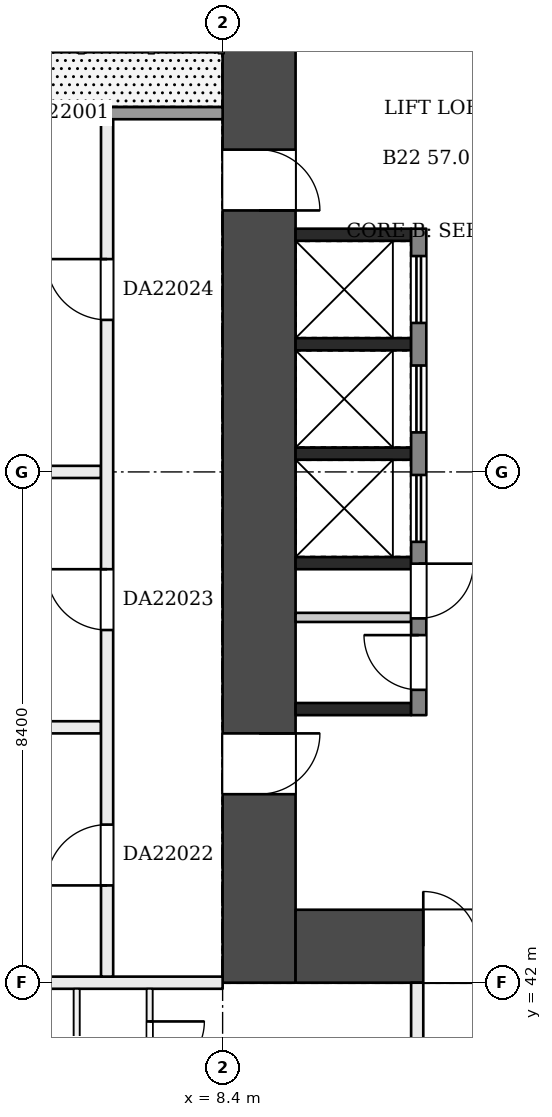
"""IFC4 building model, lengths in metres.
Left out: names, types, materials, properties, quantities, classifications, styles, units other than length and angle.
Written with IfcOpenShell. Run it as: python <this file> out.ifc"""

import sys

from ifc_helpers import new_model, si_unit, direction, frame, frame_2d, origin, place, context, subcontext, project, spatial, rectangle, extrude, element, fill, save


model = new_model("IFC4")
c1 = context("Model", 3, precision=1e-05, world=origin(), true_north=direction((0.0, 1.0)))
c2 = subcontext(c1, "Body", "Model", "MODEL_VIEW")
j1 = project(units=[si_unit("LENGTHUNIT", "METRE"), si_unit("PLANEANGLEUNIT", "RADIAN")], contexts=[c1])
p1 = place(None, origin())
s1 = spatial("IfcSite", under=j1, at=p1, CompositionType="ELEMENT")
p2 = place(p1, origin())
s2 = spatial("IfcBuilding", under=s1, at=p2, CompositionType="ELEMENT")
p3 = place(p2, frame((0.0, 0.0, 91.7)))
s3 = spatial("IfcBuildingStorey", under=s2, at=p3, CompositionType="ELEMENT", Elevation=91.7)
p4 = place(p3, frame((9.0, 58.8, 0.0), z_axis=(0.0, 0.0, 1.0), x_axis=(0.0, -1.0, 0.0)))
e1 = element("IfcWall", 1, at=p4, inside=s3, PredefinedType="SHEAR", context=c2, shape_type="SweptSolid", body=[
    extrude(rectangle(XDim=16.8, YDim=1.2, at=frame_2d((8.4, 0.0))), origin(), (0.0, 0.0, 1.0), 3.22),
])
p5 = place(p4, frame((3.1, 0.0, 0.0)))
e2 = element("IfcOpeningElement", 2, at=p5, cuts=e1, PredefinedType="OPENING", context=c2, shape_type="SweptSolid", body=[
    extrude(rectangle(XDim=1.0, YDim=2.1, at=frame_2d((0.5, 1.05))), frame((0.0, 0.61, 0.0), z_axis=(0.0, -1.0, 0.0), x_axis=(1.0, 0.0, 0.0)), (0.0, 0.0, 1.0), 1.22),
])
p6 = place(p4, frame((12.7, 0.0, 0.0)))
e3 = element("IfcOpeningElement", 3, at=p6, cuts=e1, PredefinedType="OPENING", context=c2, shape_type="SweptSolid", body=[
    extrude(rectangle(XDim=1.0, YDim=2.1, at=frame_2d((0.5, 1.05))), frame((0.0, 0.61, 0.0), z_axis=(0.0, -1.0, 0.0), x_axis=(1.0, 0.0, 0.0)), (0.0, 0.0, 1.0), 1.22),
])
p7 = place(p3, frame((9.6, 42.6, 0.0), z_axis=(0.0, 0.0, 1.0), x_axis=(1.0, 0.0, 0.0)))
e4 = element("IfcWall", 4, at=p7, inside=s3, PredefinedType="SHEAR", context=c2, shape_type="SweptSolid", body=[
    extrude(rectangle(XDim=14.4, YDim=1.2, at=frame_2d((7.2, 0.0))), origin(), (0.0, 0.0, 1.0), 3.22),
])
p8 = place(p7, frame((2.1, 0.0, 0.0)))
e5 = element("IfcOpeningElement", 5, at=p8, cuts=e4, PredefinedType="OPENING", context=c2, shape_type="SweptSolid", body=[
    extrude(rectangle(XDim=1.8, YDim=2.1, at=frame_2d((0.9, 1.05))), frame((0.0, 0.61, 0.0), z_axis=(0.0, -1.0, 0.0), x_axis=(1.0, 0.0, 0.0)), (0.0, 0.0, 1.0), 1.22),
])
for number, where, z_axis, x_axis in (
    (6, (9.6, 54.3, 0.0), (0.0, 0.0, 1.0), (1.0, 0.0, 0.0)),
    (7, (9.6, 52.5, 0.0), (0.0, 0.0, 1.0), (1.0, 0.0, 0.0)),
    (8, (9.6, 50.7, 0.0), (0.0, 0.0, 1.0), (1.0, 0.0, 0.0)),
    (9, (9.6, 48.9, 0.0), (0.0, 0.0, 1.0), (1.0, 0.0, 0.0)),
    (10, (9.6, 46.5, 0.0), (0.0, 0.0, 1.0), (1.0, 0.0, 0.0)),
):
    element("IfcWall", number, at=place(p3, frame(where, z_axis=z_axis, x_axis=x_axis)), inside=s3, PredefinedType="SHEAR", context=c2, shape_type="SweptSolid", body=[
        extrude(rectangle(XDim=1.9, YDim=0.2, at=frame_2d((0.95, 0.0))), origin(), (0.0, 0.0, 1.0), 3.22),
    ])
p9 = place(p3, frame((9.6, 48.008, 0.0), z_axis=(0.0, 0.0, 1.0), x_axis=(1.0, 0.0, 0.0)))
e11 = element("IfcWall", 11, at=p9, inside=s3, PredefinedType="PARTITIONING", context=c2, shape_type="SweptSolid", body=[
    extrude(rectangle(XDim=1.9, YDim=0.15, at=frame_2d((0.95, 0.0))), origin(), (0.0, 0.0, 1.0), 3.22),
])
p10 = place(p3, frame((11.625, 54.4, 0.0), z_axis=(0.0, 0.0, 1.0), x_axis=(0.0, -1.0, 0.0)))
e12 = element("IfcWall", 12, at=p10, inside=s3, PredefinedType="SHEAR", context=c2, shape_type="SweptSolid", body=[
    extrude(rectangle(XDim=8.0, YDim=0.25, at=frame_2d((4.0, 0.0))), origin(), (0.0, 0.0, 1.0), 3.22),
])
p11 = place(p10, frame((0.45, 0.0, 0.0)))
e13 = element("IfcOpeningElement", 13, at=p11, cuts=e12, PredefinedType="OPENING", context=c2, shape_type="SweptSolid", body=[
    extrude(rectangle(XDim=1.1, YDim=2.1, at=frame_2d((0.55, 1.05))), frame((0.0, 0.135, 0.0), z_axis=(0.0, -1.0, 0.0), x_axis=(1.0, 0.0, 0.0)), (0.0, 0.0, 1.0), 0.27),
])
p12 = place(p10, frame((2.25, 0.0, 0.0)))
e14 = element("IfcOpeningElement", 14, at=p12, cuts=e12, PredefinedType="OPENING", context=c2, shape_type="SweptSolid", body=[
    extrude(rectangle(XDim=1.1, YDim=2.1, at=frame_2d((0.55, 1.05))), frame((0.0, 0.135, 0.0), z_axis=(0.0, -1.0, 0.0), x_axis=(1.0, 0.0, 0.0)), (0.0, 0.0, 1.0), 0.27),
])
p13 = place(p10, frame((4.05, 0.0, 0.0)))
e15 = element("IfcOpeningElement", 15, at=p13, cuts=e12, PredefinedType="OPENING", context=c2, shape_type="SweptSolid", body=[
    extrude(rectangle(XDim=1.1, YDim=2.1, at=frame_2d((0.55, 1.05))), frame((0.0, 0.135, 0.0), z_axis=(0.0, -1.0, 0.0), x_axis=(1.0, 0.0, 0.0)), (0.0, 0.0, 1.0), 0.27),
])
p14 = place(p10, frame((5.509, 0.0, 0.0)))
e16 = element("IfcOpeningElement", 16, at=p14, cuts=e12, PredefinedType="OPENING", context=c2, shape_type="SweptSolid", body=[
    extrude(rectangle(XDim=0.9, YDim=2.1, at=frame_2d((0.45, 1.05))), frame((0.0, 0.135, 0.0), z_axis=(0.0, -1.0, 0.0), x_axis=(1.0, 0.0, 0.0)), (0.0, 0.0, 1.0), 0.27),
])
p15 = place(p10, frame((6.684, 0.0, 0.0)))
e17 = element("IfcOpeningElement", 17, at=p15, cuts=e12, PredefinedType="OPENING", context=c2, shape_type="SweptSolid", body=[
    extrude(rectangle(XDim=0.9, YDim=2.1, at=frame_2d((0.45, 1.05))), frame((0.0, 0.135, 0.0), z_axis=(0.0, -1.0, 0.0), x_axis=(1.0, 0.0, 0.0)), (0.0, 0.0, 1.0), 0.27),
])
p16 = place(p3, frame((2.5, 42.0, 0.0), z_axis=(0.0, 0.0, 1.0), x_axis=(1.0, 0.0, 0.0)))
e18 = element("IfcWall", 18, at=p16, inside=s3, PredefinedType="PARTITIONING", context=c2, shape_type="SweptSolid", body=[
    extrude(rectangle(XDim=5.9, YDim=0.2, at=frame_2d((2.95, 0.0))), origin(), (0.0, 0.0, 1.0), 3.22),
])
for number, where, z_axis, x_axis in (
    (19, (2.5, 46.2, 0.0), (0.0, 0.0, 1.0), (1.0, 0.0, 0.0)),
    (20, (2.5, 50.4, 0.0), (0.0, 0.0, 1.0), (1.0, 0.0, 0.0)),
):
    element("IfcWall", number, at=place(p3, frame(where, z_axis=z_axis, x_axis=x_axis)), inside=s3, PredefinedType="PARTITIONING", context=c2, shape_type="SweptSolid", body=[
        extrude(rectangle(XDim=3.9, YDim=0.2, at=frame_2d((1.95, 0.0))), origin(), (0.0, 0.0, 1.0), 3.22),
    ])
p17 = place(p3, frame((6.0, 21.0, 0.0), z_axis=(0.0, 0.0, 1.0), x_axis=(0.0, 1.0, 0.0)))
e21 = element("IfcWall", 21, at=p17, inside=s3, PredefinedType="PARTITIONING", context=c2, shape_type="SweptSolid", body=[
    extrude(rectangle(XDim=20.9, YDim=0.1, at=frame_2d((10.45, 0.0))), origin(), (0.0, 0.0, 1.0), 3.22),
])
p18 = place(p17, frame((1.6, 0.0, 0.0)))
e22 = element("IfcOpeningElement", 22, at=p18, cuts=e21, PredefinedType="OPENING", context=c2, shape_type="SweptSolid", body=[
    extrude(rectangle(XDim=0.9, YDim=2.1, at=frame_2d((0.45, 1.05))), frame((0.0, 0.06, 0.0), z_axis=(0.0, -1.0, 0.0), x_axis=(1.0, 0.0, 0.0)), (0.0, 0.0, 1.0), 0.12),
])
p19 = place(p17, frame((5.8, 0.0, 0.0)))
e23 = element("IfcOpeningElement", 23, at=p19, cuts=e21, PredefinedType="OPENING", context=c2, shape_type="SweptSolid", body=[
    extrude(rectangle(XDim=0.9, YDim=2.1, at=frame_2d((0.45, 1.05))), frame((0.0, 0.06, 0.0), z_axis=(0.0, -1.0, 0.0), x_axis=(1.0, 0.0, 0.0)), (0.0, 0.0, 1.0), 0.12),
])
p20 = place(p17, frame((10.0, 0.0, 0.0)))
e24 = element("IfcOpeningElement", 24, at=p20, cuts=e21, PredefinedType="OPENING", context=c2, shape_type="SweptSolid", body=[
    extrude(rectangle(XDim=0.9, YDim=2.1, at=frame_2d((0.45, 1.05))), frame((0.0, 0.06, 0.0), z_axis=(0.0, -1.0, 0.0), x_axis=(1.0, 0.0, 0.0)), (0.0, 0.0, 1.0), 0.12),
])
p21 = place(p17, frame((14.2, 0.0, 0.0)))
e25 = element("IfcOpeningElement", 25, at=p21, cuts=e21, PredefinedType="OPENING", context=c2, shape_type="SweptSolid", body=[
    extrude(rectangle(XDim=0.9, YDim=2.1, at=frame_2d((0.45, 1.05))), frame((0.0, 0.06, 0.0), z_axis=(0.0, -1.0, 0.0), x_axis=(1.0, 0.0, 0.0)), (0.0, 0.0, 1.0), 0.12),
])
p22 = place(p17, frame((18.4, 0.0, 0.0)))
e26 = element("IfcOpeningElement", 26, at=p22, cuts=e21, PredefinedType="OPENING", context=c2, shape_type="SweptSolid", body=[
    extrude(rectangle(XDim=0.9, YDim=2.1, at=frame_2d((0.45, 1.05))), frame((0.0, 0.06, 0.0), z_axis=(0.0, -1.0, 0.0), x_axis=(1.0, 0.0, 0.0)), (0.0, 0.0, 1.0), 0.12),
])
p23 = place(p3, frame((6.5, 42.1, 0.0), z_axis=(0.0, 0.0, 1.0), x_axis=(0.0, 1.0, 0.0)))
e27 = element("IfcWall", 27, at=p23, inside=s3, PredefinedType="PARTITIONING", context=c2, shape_type="SweptSolid", body=[
    extrude(rectangle(XDim=14.2, YDim=0.2, at=frame_2d((7.1, 0.0))), origin(), (0.0, 0.0, 1.0), 3.22),
])
p24 = place(p23, frame((1.5, 0.0, 0.0)))
e28 = element("IfcOpeningElement", 28, at=p24, cuts=e27, PredefinedType="OPENING", context=c2, shape_type="SweptSolid", body=[
    extrude(rectangle(XDim=1.0, YDim=2.1, at=frame_2d((0.5, 1.05))), frame((0.0, 0.11, 0.0), z_axis=(0.0, -1.0, 0.0), x_axis=(1.0, 0.0, 0.0)), (0.0, 0.0, 1.0), 0.22),
])
p25 = place(p23, frame((5.7, 0.0, 0.0)))
e29 = element("IfcOpeningElement", 29, at=p25, cuts=e27, PredefinedType="OPENING", context=c2, shape_type="SweptSolid", body=[
    extrude(rectangle(XDim=1.0, YDim=2.1, at=frame_2d((0.5, 1.05))), frame((0.0, 0.11, 0.0), z_axis=(0.0, -1.0, 0.0), x_axis=(1.0, 0.0, 0.0)), (0.0, 0.0, 1.0), 0.22),
])
p26 = place(p23, frame((10.8, 0.0, 0.0)))
e30 = element("IfcOpeningElement", 30, at=p26, cuts=e27, PredefinedType="OPENING", context=c2, shape_type="SweptSolid", body=[
    extrude(rectangle(XDim=1.0, YDim=2.1, at=frame_2d((0.5, 1.05))), frame((0.0, 0.11, 0.0), z_axis=(0.0, -1.0, 0.0), x_axis=(1.0, 0.0, 0.0)), (0.0, 0.0, 1.0), 0.22),
])
p27 = place(p3, frame((7.2, 21.0, 0.0), z_axis=(0.0, 0.0, 1.0), x_axis=(0.0, 1.0, 0.0)))
e31 = element("IfcWall", 31, at=p27, inside=s3, PredefinedType="PARTITIONING", context=c2, shape_type="SweptSolid", body=[
    extrude(rectangle(XDim=20.9, YDim=0.1, at=frame_2d((10.45, 0.0))), origin(), (0.0, 0.0, 1.0), 3.22),
])
p28 = place(p27, frame((0.7, 0.0, 0.0)))
e32 = element("IfcOpeningElement", 32, at=p28, cuts=e31, PredefinedType="OPENING", context=c2, shape_type="SweptSolid", body=[
    extrude(rectangle(XDim=0.9, YDim=2.1, at=frame_2d((0.45, 1.05))), frame((0.0, 0.06, 0.0), z_axis=(0.0, -1.0, 0.0), x_axis=(1.0, 0.0, 0.0)), (0.0, 0.0, 1.0), 0.12),
])
p29 = place(p27, frame((2.838, 0.0, 0.0)))
e33 = element("IfcOpeningElement", 33, at=p29, cuts=e31, PredefinedType="OPENING", context=c2, shape_type="SweptSolid", body=[
    extrude(rectangle(XDim=0.9, YDim=2.1, at=frame_2d((0.45, 1.05))), frame((0.0, 0.06, 0.0), z_axis=(0.0, -1.0, 0.0), x_axis=(1.0, 0.0, 0.0)), (0.0, 0.0, 1.0), 0.12),
])
p30 = place(p27, frame((6.375, 0.0, 0.0)))
e34 = element("IfcOpeningElement", 34, at=p30, cuts=e31, PredefinedType="OPENING", context=c2, shape_type="SweptSolid", body=[
    extrude(rectangle(XDim=0.9, YDim=2.1, at=frame_2d((0.45, 1.05))), frame((0.0, 0.06, 0.0), z_axis=(0.0, -1.0, 0.0), x_axis=(1.0, 0.0, 0.0)), (0.0, 0.0, 1.0), 0.12),
])
p31 = place(p27, frame((9.113, 0.0, 0.0)))
e35 = element("IfcOpeningElement", 35, at=p31, cuts=e31, PredefinedType="OPENING", context=c2, shape_type="SweptSolid", body=[
    extrude(rectangle(XDim=0.9, YDim=2.1, at=frame_2d((0.45, 1.05))), frame((0.0, 0.06, 0.0), z_axis=(0.0, -1.0, 0.0), x_axis=(1.0, 0.0, 0.0)), (0.0, 0.0, 1.0), 0.12),
])
p32 = place(p27, frame((11.25, 0.0, 0.0)))
e36 = element("IfcOpeningElement", 36, at=p32, cuts=e31, PredefinedType="OPENING", context=c2, shape_type="SweptSolid", body=[
    extrude(rectangle(XDim=0.9, YDim=2.1, at=frame_2d((0.45, 1.05))), frame((0.0, 0.06, 0.0), z_axis=(0.0, -1.0, 0.0), x_axis=(1.0, 0.0, 0.0)), (0.0, 0.0, 1.0), 0.12),
])
p33 = place(p27, frame((14.288, 0.0, 0.0)))
e37 = element("IfcOpeningElement", 37, at=p33, cuts=e31, PredefinedType="OPENING", context=c2, shape_type="SweptSolid", body=[
    extrude(rectangle(XDim=0.9, YDim=2.1, at=frame_2d((0.45, 1.05))), frame((0.0, 0.06, 0.0), z_axis=(0.0, -1.0, 0.0), x_axis=(1.0, 0.0, 0.0)), (0.0, 0.0, 1.0), 0.12),
])
p34 = place(p27, frame((17.025, 0.0, 0.0)))
e38 = element("IfcOpeningElement", 38, at=p34, cuts=e31, PredefinedType="OPENING", context=c2, shape_type="SweptSolid", body=[
    extrude(rectangle(XDim=0.9, YDim=2.1, at=frame_2d((0.45, 1.05))), frame((0.0, 0.06, 0.0), z_axis=(0.0, -1.0, 0.0), x_axis=(1.0, 0.0, 0.0)), (0.0, 0.0, 1.0), 0.12),
])
p35 = place(p27, frame((19.463, 0.0, 0.0)))
e39 = element("IfcOpeningElement", 39, at=p35, cuts=e31, PredefinedType="OPENING", context=c2, shape_type="SweptSolid", body=[
    extrude(rectangle(XDim=0.9, YDim=2.1, at=frame_2d((0.45, 1.05))), frame((0.0, 0.06, 0.0), z_axis=(0.0, -1.0, 0.0), x_axis=(1.0, 0.0, 0.0)), (0.0, 0.0, 1.0), 0.12),
])
p36 = place(p3, frame((11.6, 10.9, 0.0), z_axis=(0.0, 0.0, 1.0), x_axis=(0.0, 1.0, 0.0)))
e40 = element("IfcWall", 40, at=p36, inside=s3, PredefinedType="PARTITIONING", context=c2, shape_type="SweptSolid", body=[
    extrude(rectangle(XDim=31.1, YDim=0.2, at=frame_2d((15.55, 0.0))), origin(), (0.0, 0.0, 1.0), 3.22),
])
p37 = place(p36, frame((6.3, 0.0, 0.0)))
e41 = element("IfcOpeningElement", 41, at=p37, cuts=e40, PredefinedType="OPENING", context=c2, shape_type="SweptSolid", body=[
    extrude(rectangle(XDim=1.0, YDim=2.1, at=frame_2d((0.5, 1.05))), frame((0.0, 0.11, 0.0), z_axis=(0.0, -1.0, 0.0), x_axis=(1.0, 0.0, 0.0)), (0.0, 0.0, 1.0), 0.22),
])
p38 = place(p36, frame((10.8, 0.0, 0.0)))
e42 = element("IfcOpeningElement", 42, at=p38, cuts=e40, PredefinedType="OPENING", context=c2, shape_type="SweptSolid", body=[
    extrude(rectangle(XDim=1.0, YDim=2.1, at=frame_2d((0.5, 1.05))), frame((0.0, 0.11, 0.0), z_axis=(0.0, -1.0, 0.0), x_axis=(1.0, 0.0, 0.0)), (0.0, 0.0, 1.0), 0.22),
])
p39 = place(p3, frame((8.4, 56.3, 0.0), z_axis=(0.0, 0.0, 1.0), x_axis=(-1.0, 0.0, 0.0)))
e43 = element("IfcWall", 43, at=p39, inside=s3, PredefinedType="SOLIDWALL", context=c2, shape_type="SweptSolid", body=[
    extrude(rectangle(XDim=3.6, YDim=0.2, at=frame_2d((1.8, 0.0))), origin(), (0.0, 0.0, 1.0), 3.22),
])
p40 = place(p39, frame((2.0, 0.0, 0.9)))
e44 = element("IfcOpeningElement", 44, at=p40, cuts=e43, PredefinedType="OPENING", context=c2, shape_type="SweptSolid", body=[
    extrude(rectangle(XDim=1.3, YDim=1.5, at=frame_2d((0.65, 0.75))), frame((0.0, 0.11, 0.0), z_axis=(0.0, -1.0, 0.0), x_axis=(1.0, 0.0, 0.0)), (0.0, 0.0, 1.0), 0.22),
])
p41 = place(p5, origin())
e45 = element("IfcDoor", 45, at=p41, inside=s3, OperationType="SINGLE_SWING_RIGHT", PredefinedType="DOOR", context=c2, shape_type="SweptSolid", body=[
    extrude(rectangle(XDim=1.0, YDim=2.1, at=frame_2d((0.5, 1.05))), frame((0.0, 0.025, 0.0), z_axis=(0.0, -1.0, 0.0), x_axis=(1.0, 0.0, 0.0)), (0.0, 0.0, 1.0), 0.05),
])
fill(e2, e45)
p42 = place(p6, origin())
e46 = element("IfcDoor", 46, at=p42, inside=s3, OperationType="SINGLE_SWING_LEFT", PredefinedType="DOOR", context=c2, shape_type="SweptSolid", body=[
    extrude(rectangle(XDim=1.0, YDim=2.1, at=frame_2d((0.5, 1.05))), frame((0.0, 0.025, 0.0), z_axis=(0.0, -1.0, 0.0), x_axis=(1.0, 0.0, 0.0)), (0.0, 0.0, 1.0), 0.05),
])
fill(e3, e46)
p43 = place(p8, origin())
e47 = element("IfcDoor", 47, at=p43, inside=s3, OperationType="DOUBLE_DOOR_SINGLE_SWING", PredefinedType="DOOR", context=c2, shape_type="SweptSolid", body=[
    extrude(rectangle(XDim=1.8, YDim=2.1, at=frame_2d((0.9, 1.05))), frame((0.0, 0.025, 0.0), z_axis=(0.0, -1.0, 0.0), x_axis=(1.0, 0.0, 0.0)), (0.0, 0.0, 1.0), 0.05),
])
fill(e5, e47)
p44 = place(p11, origin())
e48 = element("IfcDoor", 48, at=p44, inside=s3, OperationType="DOUBLE_DOOR_SLIDING", PredefinedType="DOOR", context=c2, shape_type="SweptSolid", body=[
    extrude(rectangle(XDim=1.1, YDim=2.1, at=frame_2d((0.55, 1.05))), frame((0.0, 0.025, 0.0), z_axis=(0.0, -1.0, 0.0), x_axis=(1.0, 0.0, 0.0)), (0.0, 0.0, 1.0), 0.05),
])
fill(e13, e48)
p45 = place(p12, origin())
e49 = element("IfcDoor", 49, at=p45, inside=s3, OperationType="DOUBLE_DOOR_SLIDING", PredefinedType="DOOR", context=c2, shape_type="SweptSolid", body=[
    extrude(rectangle(XDim=1.1, YDim=2.1, at=frame_2d((0.55, 1.05))), frame((0.0, 0.025, 0.0), z_axis=(0.0, -1.0, 0.0), x_axis=(1.0, 0.0, 0.0)), (0.0, 0.0, 1.0), 0.05),
])
fill(e14, e49)
p46 = place(p13, origin())
e50 = element("IfcDoor", 50, at=p46, inside=s3, OperationType="DOUBLE_DOOR_SLIDING", PredefinedType="DOOR", context=c2, shape_type="SweptSolid", body=[
    extrude(rectangle(XDim=1.1, YDim=2.1, at=frame_2d((0.55, 1.05))), frame((0.0, 0.025, 0.0), z_axis=(0.0, -1.0, 0.0), x_axis=(1.0, 0.0, 0.0)), (0.0, 0.0, 1.0), 0.05),
])
fill(e15, e50)
p47 = place(p14, origin())
e51 = element("IfcDoor", 51, at=p47, inside=s3, OperationType="SINGLE_SWING_LEFT", PredefinedType="DOOR", context=c2, shape_type="SweptSolid", body=[
    extrude(rectangle(XDim=0.9, YDim=2.1, at=frame_2d((0.45, 1.05))), frame((0.0, 0.025, 0.0), z_axis=(0.0, -1.0, 0.0), x_axis=(1.0, 0.0, 0.0)), (0.0, 0.0, 1.0), 0.05),
])
fill(e16, e51)
p48 = place(p15, frame((0.9, 0.0, 0.0), z_axis=(0.0, 0.0, 1.0), x_axis=(-1.0, 0.0, 0.0)))
e52 = element("IfcDoor", 52, at=p48, inside=s3, OperationType="SINGLE_SWING_RIGHT", PredefinedType="DOOR", context=c2, shape_type="SweptSolid", body=[
    extrude(rectangle(XDim=0.9, YDim=2.1, at=frame_2d((0.45, 1.05))), frame((0.0, 0.025, 0.0), z_axis=(0.0, -1.0, 0.0), x_axis=(1.0, 0.0, 0.0)), (0.0, 0.0, 1.0), 0.05),
])
fill(e17, e52)
p49 = place(p24, origin())
e53 = element("IfcDoor", 53, at=p49, inside=s3, OperationType="SINGLE_SWING_LEFT", PredefinedType="DOOR", context=c2, shape_type="SweptSolid", body=[
    extrude(rectangle(XDim=1.0, YDim=2.1, at=frame_2d((0.5, 1.05))), frame((0.0, 0.025, 0.0), z_axis=(0.0, -1.0, 0.0), x_axis=(1.0, 0.0, 0.0)), (0.0, 0.0, 1.0), 0.05),
])
fill(e28, e53)
p50 = place(p25, origin())
e54 = element("IfcDoor", 54, at=p50, inside=s3, OperationType="SINGLE_SWING_RIGHT", PredefinedType="DOOR", context=c2, shape_type="SweptSolid", body=[
    extrude(rectangle(XDim=1.0, YDim=2.1, at=frame_2d((0.5, 1.05))), frame((0.0, 0.025, 0.0), z_axis=(0.0, -1.0, 0.0), x_axis=(1.0, 0.0, 0.0)), (0.0, 0.0, 1.0), 0.05),
])
fill(e29, e54)
p51 = place(p26, origin())
e55 = element("IfcDoor", 55, at=p51, inside=s3, OperationType="SINGLE_SWING_RIGHT", PredefinedType="DOOR", context=c2, shape_type="SweptSolid", body=[
    extrude(rectangle(XDim=1.0, YDim=2.1, at=frame_2d((0.5, 1.05))), frame((0.0, 0.025, 0.0), z_axis=(0.0, -1.0, 0.0), x_axis=(1.0, 0.0, 0.0)), (0.0, 0.0, 1.0), 0.05),
])
fill(e30, e55)
p52 = place(p35, frame((0.9, 0.0, 0.0), z_axis=(0.0, 0.0, 1.0), x_axis=(-1.0, 0.0, 0.0)))
e56 = element("IfcDoor", 56, at=p52, inside=s3, OperationType="SINGLE_SWING_LEFT", PredefinedType="DOOR", context=c2, shape_type="SweptSolid", body=[
    extrude(rectangle(XDim=0.9, YDim=2.1, at=frame_2d((0.45, 1.05))), frame((0.0, 0.025, 0.0), z_axis=(0.0, -1.0, 0.0), x_axis=(1.0, 0.0, 0.0)), (0.0, 0.0, 1.0), 0.05),
])
fill(e39, e56)
p53 = place(p40, origin())
e57 = element("IfcWindow", 57, at=p53, inside=s3, PartitioningType="SINGLE_PANEL", PredefinedType="WINDOW", context=c2, shape_type="SweptSolid", body=[
    extrude(rectangle(XDim=1.3, YDim=1.5, at=frame_2d((0.65, 0.75))), frame((0.0, 0.03, 0.0), z_axis=(0.0, -1.0, 0.0), x_axis=(1.0, 0.0, 0.0)), (0.0, 0.0, 1.0), 0.06),
])
fill(e44, e57)
save(model, sys.argv[1])
